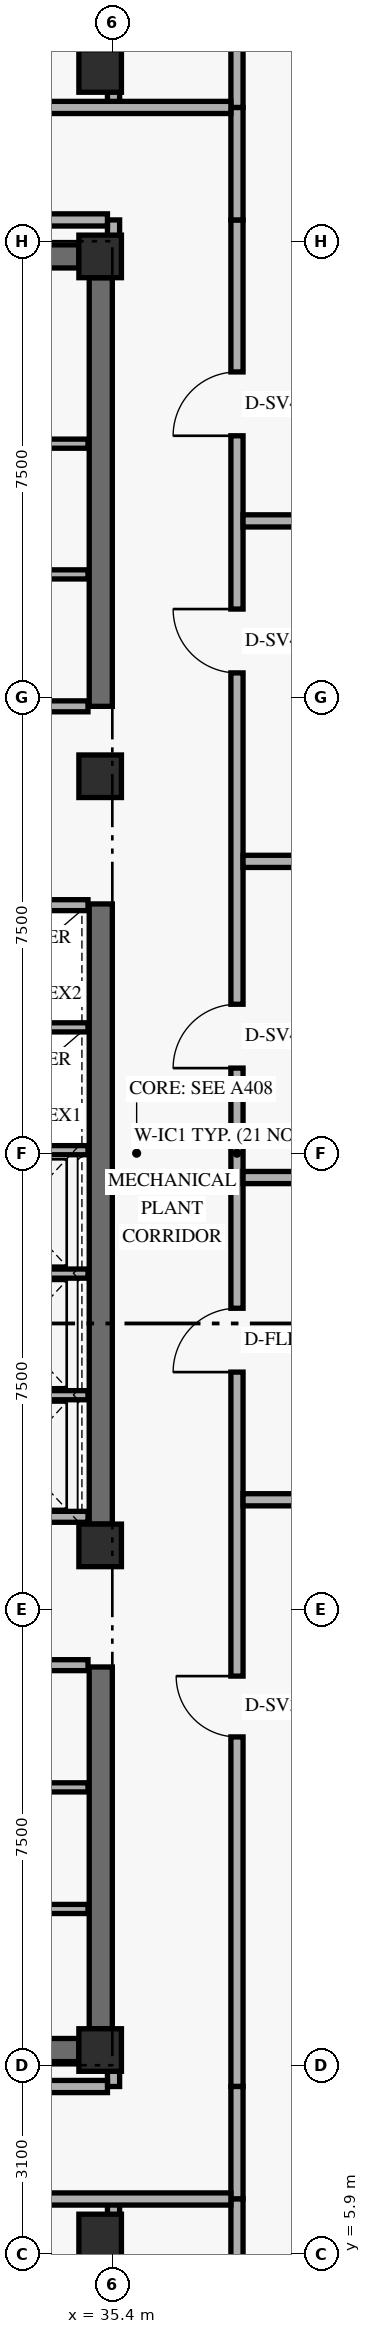
"""IFC4 building model, lengths in metres.
Left out: names, types, materials, properties, quantities, classifications, styles, units other than length and angle.
Written with IfcOpenShell. Run it as: python <this file> out.ifc"""

import sys

from ifc_helpers import new_model, si_unit, direction, frame, frame_2d, origin, origin_2d, place, context, subcontext, project, spatial, rectangle, extrude, element, fill, save


model = new_model("IFC4")
c1 = context("Model", 3, precision=1e-05, world=origin(), true_north=direction((0.0, 1.0)))
c2 = subcontext(c1, "Body", "Model", "MODEL_VIEW")
j1 = project(units=[si_unit("LENGTHUNIT", "METRE"), si_unit("PLANEANGLEUNIT", "RADIAN")], contexts=[c1])
p1 = place(None, origin())
s1 = spatial("IfcSite", under=j1, at=p1, CompositionType="ELEMENT")
p2 = place(p1, origin())
s2 = spatial("IfcBuilding", under=s1, at=p2, CompositionType="ELEMENT")
p3 = place(p2, frame((0.0, 0.0, 199.8)))
s3 = spatial("IfcBuildingStorey", under=s2, at=p3, CompositionType="ELEMENT", Elevation=199.8)
p4 = place(p3, frame((35.21, 9.6, 0.0), z_axis=(0.0, 0.0, 1.0), x_axis=(0.0, 1.0, 0.0)))
e1 = element("IfcWall", 1, at=p4, inside=s3, PredefinedType="SHEAR", context=c2, shape_type="SweptSolid", body=[
    extrude(rectangle(XDim=5.95, YDim=0.38, at=frame_2d((2.975, 0.0))), origin(), (0.0, 0.0, 1.0), 5.148),
])
p5 = place(p3, frame((35.21, 17.9, 0.0), z_axis=(0.0, 0.0, 1.0), x_axis=(0.0, 1.0, 0.0)))
e2 = element("IfcWall", 2, at=p5, inside=s3, PredefinedType="SHEAR", context=c2, shape_type="SweptSolid", body=[
    extrude(rectangle(XDim=10.2, YDim=0.38, at=frame_2d((5.1, 0.0))), origin(), (0.0, 0.0, 1.0), 5.148),
])
p6 = place(p3, frame((35.21, 31.35, 0.0), z_axis=(0.0, 0.0, 1.0), x_axis=(0.0, 1.0, 0.0)))
e3 = element("IfcWall", 3, at=p6, inside=s3, PredefinedType="SHEAR", context=c2, shape_type="SweptSolid", body=[
    extrude(rectangle(XDim=7.05, YDim=0.38, at=frame_2d((3.525, 0.0))), origin(), (0.0, 0.0, 1.0), 5.148),
])
for number, where, z_axis, x_axis in (
    (4, (24.55, 9.25, 0.0), (0.0, 0.0, 1.0), (1.0, 0.0, 0.0)),
    (5, (24.55, 38.75, 0.0), (0.0, 0.0, 1.0), (1.0, 0.0, 0.0)),
):
    element("IfcWall", number, at=place(p3, frame(where, z_axis=z_axis, x_axis=x_axis)), inside=s3, PredefinedType="SHEAR", context=c2, shape_type="SweptSolid", body=[
        extrude(rectangle(XDim=10.3, YDim=0.38, at=frame_2d((5.15, 0.0))), origin(), (0.0, 0.0, 1.0), 5.76),
    ])
for number, where, z_axis, x_axis in (
    (6, (35.2, 6.2, 0.0), (0.0, 0.0, 1.0), (1.0, 0.0, 0.0)),
    (7, (35.2, 9.25, 0.0), (0.0, 0.0, 1.0), (1.0, 0.0, 0.0)),
    (8, (35.2, 17.55, 0.0), (0.0, 0.0, 1.0), (1.0, 0.0, 0.0)),
    (9, (35.2, 30.2, 0.0), (0.0, 0.0, 1.0), (1.0, 0.0, 0.0)),
    (10, (35.2, 38.75, 0.0), (0.0, 0.0, 1.0), (1.0, 0.0, 0.0)),
    (11, (35.2, 41.8, 0.0), (0.0, 0.0, 1.0), (1.0, 0.0, 0.0)),
):
    element("IfcColumn", number, at=place(p3, frame(where, z_axis=z_axis, x_axis=x_axis)), inside=s3, PredefinedType="COLUMN", context=c2, shape_type="SweptSolid", body=[
        extrude(rectangle(XDim=0.7, YDim=0.7, at=origin_2d()), origin(), (0.0, 0.0, 1.0), 6.0),
    ])
p7 = place(p3, frame((32.74, 15.58, 0.0), z_axis=(0.0, 0.0, 1.0), x_axis=(1.0, 0.0, 0.0)))
e12 = element("IfcWall", 12, at=p7, inside=s3, PredefinedType="STANDARD", context=c2, shape_type="SweptSolid", body=[
    extrude(rectangle(XDim=2.26, YDim=0.18, at=frame_2d((1.13, 0.0))), origin(), (0.0, 0.0, 1.0), 5.76),
])
for number, where, z_axis, x_axis in (
    (13, (32.74, 11.57, 0.0), (0.0, 0.0, 1.0), (1.0, 0.0, 0.0)),
    (14, (32.74, 13.57, 0.0), (0.0, 0.0, 1.0), (1.0, 0.0, 0.0)),
):
    element("IfcWall", number, at=place(p3, frame(where, z_axis=z_axis, x_axis=x_axis)), inside=s3, PredefinedType="STANDARD", context=c2, shape_type="SweptSolid", body=[
        extrude(rectangle(XDim=2.26, YDim=0.15, at=frame_2d((1.13, 0.0))), origin(), (0.0, 0.0, 1.0), 5.76),
    ])
for number, where, z_axis, x_axis in (
    (15, (32.74, 18.02, 0.0), (0.0, 0.0, 1.0), (1.0, 0.0, 0.0)),
    (16, (32.74, 28.08, 0.0), (0.0, 0.0, 1.0), (1.0, 0.0, 0.0)),
):
    element("IfcWall", number, at=place(p3, frame(where, z_axis=z_axis, x_axis=x_axis)), inside=s3, PredefinedType="STANDARD", context=c2, shape_type="SweptSolid", body=[
        extrude(rectangle(XDim=2.26, YDim=0.18, at=frame_2d((1.13, 0.0))), origin(), (0.0, 0.0, 1.0), 5.76),
    ])
for number, where, z_axis, x_axis in (
    (17, (32.74, 20.02, 0.0), (0.0, 0.0, 1.0), (1.0, 0.0, 0.0)),
    (18, (32.74, 22.02, 0.0), (0.0, 0.0, 1.0), (1.0, 0.0, 0.0)),
    (19, (32.74, 24.05, 0.0), (0.0, 0.0, 1.0), (1.0, 0.0, 0.0)),
    (20, (32.74, 26.07, 0.0), (0.0, 0.0, 1.0), (1.0, 0.0, 0.0)),
):
    element("IfcWall", number, at=place(p3, frame(where, z_axis=z_axis, x_axis=x_axis)), inside=s3, PredefinedType="STANDARD", context=c2, shape_type="SweptSolid", body=[
        extrude(rectangle(XDim=2.26, YDim=0.15, at=frame_2d((1.13, 0.0))), origin(), (0.0, 0.0, 1.0), 5.76),
    ])
p8 = place(p3, frame((32.74, 31.35, 0.0), z_axis=(0.0, 0.0, 1.0), x_axis=(1.0, 0.0, 0.0)))
e21 = element("IfcWall", 21, at=p8, inside=s3, PredefinedType="STANDARD", context=c2, shape_type="SweptSolid", body=[
    extrude(rectangle(XDim=2.26, YDim=0.18, at=frame_2d((1.13, 0.0))), origin(), (0.0, 0.0, 1.0), 5.76),
])
for number, where, z_axis, x_axis in (
    (22, (32.74, 33.52, 0.0), (0.0, 0.0, 1.0), (1.0, 0.0, 0.0)),
    (23, (32.74, 35.67, 0.0), (0.0, 0.0, 1.0), (1.0, 0.0, 0.0)),
):
    element("IfcWall", number, at=place(p3, frame(where, z_axis=z_axis, x_axis=x_axis)), inside=s3, PredefinedType="STANDARD", context=c2, shape_type="SweptSolid", body=[
        extrude(rectangle(XDim=2.26, YDim=0.15, at=frame_2d((1.13, 0.0))), origin(), (0.0, 0.0, 1.0), 5.76),
    ])
p9 = place(p3, frame((37.45, 8.65, 0.0), z_axis=(0.0, 0.0, 1.0), x_axis=(0.0, 1.0, 0.0)))
e24 = element("IfcWall", 24, at=p9, inside=s3, PredefinedType="STANDARD", context=c2, shape_type="SweptSolid", body=[
    extrude(rectangle(XDim=30.7, YDim=0.2, at=frame_2d((15.35, 0.0))), origin(), (0.0, 0.0, 1.0), 5.13),
])
p10 = place(p9, frame((11.75, 0.0, 0.0)))
e25 = element("IfcOpeningElement", 25, at=p10, cuts=e24, PredefinedType="OPENING", context=c2, shape_type="SweptSolid", body=[
    extrude(rectangle(XDim=1.05, YDim=2.15, at=frame_2d((0.525, 1.075))), frame((0.0, 0.11, 0.0), z_axis=(0.0, -1.0, 0.0), x_axis=(1.0, 0.0, 0.0)), (0.0, 0.0, 1.0), 0.22),
])
p11 = place(p9, frame((5.75, 0.0, 0.0)))
e26 = element("IfcOpeningElement", 26, at=p11, cuts=e24, PredefinedType="OPENING", context=c2, shape_type="SweptSolid", body=[
    extrude(rectangle(XDim=1.0, YDim=2.15, at=frame_2d((0.5, 1.075))), frame((0.0, 0.11, 0.0), z_axis=(0.0, -1.0, 0.0), x_axis=(1.0, 0.0, 0.0)), (0.0, 0.0, 1.0), 0.22),
])
p12 = place(p9, frame((16.75, 0.0, 0.0)))
e27 = element("IfcOpeningElement", 27, at=p12, cuts=e24, PredefinedType="OPENING", context=c2, shape_type="SweptSolid", body=[
    extrude(rectangle(XDim=1.05, YDim=2.15, at=frame_2d((0.525, 1.075))), frame((0.0, 0.11, 0.0), z_axis=(0.0, -1.0, 0.0), x_axis=(1.0, 0.0, 0.0)), (0.0, 0.0, 1.0), 0.22),
])
p13 = place(p9, frame((23.25, 0.0, 0.0)))
e28 = element("IfcOpeningElement", 28, at=p13, cuts=e24, PredefinedType="OPENING", context=c2, shape_type="SweptSolid", body=[
    extrude(rectangle(XDim=1.05, YDim=2.15, at=frame_2d((0.525, 1.075))), frame((0.0, 0.11, 0.0), z_axis=(0.0, -1.0, 0.0), x_axis=(1.0, 0.0, 0.0)), (0.0, 0.0, 1.0), 0.22),
])
p14 = place(p9, frame((27.15, 0.0, 0.0)))
e29 = element("IfcOpeningElement", 29, at=p14, cuts=e24, PredefinedType="OPENING", context=c2, shape_type="SweptSolid", body=[
    extrude(rectangle(XDim=1.05, YDim=2.15, at=frame_2d((0.525, 1.075))), frame((0.0, 0.11, 0.0), z_axis=(0.0, -1.0, 0.0), x_axis=(1.0, 0.0, 0.0)), (0.0, 0.0, 1.0), 0.22),
])
for number, where, z_axis, x_axis in (
    (30, (37.45, 6.8, 0.0), (0.0, 0.0, 1.0), (0.0, 1.0, 0.0)),
    (31, (37.45, 39.35, 0.0), (0.0, 0.0, 1.0), (0.0, 1.0, 0.0)),
):
    element("IfcWall", number, at=place(p3, frame(where, z_axis=z_axis, x_axis=x_axis)), inside=s3, PredefinedType="STANDARD", context=c2, shape_type="SweptSolid", body=[
        extrude(rectangle(XDim=1.85, YDim=0.2, at=frame_2d((0.925, 0.0))), origin(), (0.0, 0.0, 1.0), 5.76),
    ])
for number, where, z_axis, x_axis in (
    (32, (37.45, 4.31, 0.0), (0.0, 0.0, 1.0), (0.0, 1.0, 0.0)),
    (33, (37.45, 41.2, 0.0), (0.0, 0.0, 1.0), (0.0, 1.0, 0.0)),
):
    element("IfcWall", number, at=place(p3, frame(where, z_axis=z_axis, x_axis=x_axis)), inside=s3, PredefinedType="STANDARD", context=c2, shape_type="SweptSolid", body=[
        extrude(rectangle(XDim=2.49, YDim=0.2, at=frame_2d((1.245, 0.0))), origin(), (0.0, 0.0, 1.0), 5.279),
    ])
p15 = place(p3, frame((35.42, 4.31, 0.0), z_axis=(0.0, 0.0, 1.0), x_axis=(0.0, 1.0, 0.0)))
e34 = element("IfcWall", 34, at=p15, inside=s3, PredefinedType="STANDARD", context=c2, shape_type="SweptSolid", body=[
    extrude(rectangle(XDim=2.49, YDim=0.2, at=frame_2d((1.245, 0.0))), origin(), (0.0, 0.0, 1.0), 5.13),
])
for number, where, z_axis, x_axis in (
    (35, (35.42, 8.65, 0.0), (0.0, 0.0, 1.0), (0.0, 1.0, 0.0)),
    (36, (35.42, 38.75, 0.0), (0.0, 0.0, 1.0), (0.0, 1.0, 0.0)),
):
    element("IfcWall", number, at=place(p3, frame(where, z_axis=z_axis, x_axis=x_axis)), inside=s3, PredefinedType="STANDARD", context=c2, shape_type="SweptSolid", body=[
        extrude(rectangle(XDim=0.6, YDim=0.2, at=frame_2d((0.3, 0.0))), origin(), (0.0, 0.0, 1.0), 5.13),
    ])
p16 = place(p3, frame((35.42, 41.2, 0.0), z_axis=(0.0, 0.0, 1.0), x_axis=(0.0, 1.0, 0.0)))
e37 = element("IfcWall", 37, at=p16, inside=s3, PredefinedType="STANDARD", context=c2, shape_type="SweptSolid", body=[
    extrude(rectangle(XDim=2.49, YDim=0.2, at=frame_2d((1.245, 0.0))), origin(), (0.0, 0.0, 1.0), 5.13),
])
for number, where, z_axis, x_axis in (
    (38, (37.55, 18.3, 0.0), (0.0, 0.0, 1.0), (1.0, 0.0, 0.0)),
    (39, (37.55, 23.6, 0.0), (0.0, 0.0, 1.0), (1.0, 0.0, 0.0)),
):
    element("IfcWall", number, at=place(p3, frame(where, z_axis=z_axis, x_axis=x_axis)), inside=s3, PredefinedType="STANDARD", context=c2, shape_type="SweptSolid", body=[
        extrude(rectangle(XDim=5.65, YDim=0.2, at=frame_2d((2.825, 0.0))), origin(), (0.0, 0.0, 1.0), 5.76),
    ])
p17 = place(p3, frame((37.55, 28.8, 0.0), z_axis=(0.0, 0.0, 1.0), x_axis=(1.0, 0.0, 0.0)))
e40 = element("IfcWall", 40, at=p17, inside=s3, PredefinedType="STANDARD", context=c2, shape_type="SweptSolid", body=[
    extrude(rectangle(XDim=11.34, YDim=0.2, at=frame_2d((5.67, 0.0))), origin(), (0.0, 0.0, 1.0), 5.13),
])
p18 = place(p3, frame((37.55, 34.4, 0.0), z_axis=(0.0, 0.0, 1.0), x_axis=(1.0, 0.0, 0.0)))
e41 = element("IfcWall", 41, at=p18, inside=s3, PredefinedType="STANDARD", context=c2, shape_type="SweptSolid", body=[
    extrude(rectangle(XDim=20.74, YDim=0.2, at=frame_2d((10.37, 0.0))), origin(), (0.0, 0.0, 1.0), 5.13),
])
p19 = place(p3, frame((21.75, 6.8, 0.0), z_axis=(0.0, 0.0, 1.0), x_axis=(1.0, 0.0, 0.0)))
e42 = element("IfcWall", 42, at=p19, inside=s3, PredefinedType="STANDARD", context=c2, shape_type="SweptSolid", body=[
    extrude(rectangle(XDim=15.6, YDim=0.2, at=frame_2d((7.8, 0.0))), origin(), (0.0, 0.0, 1.0), 5.13),
])
p20 = place(p19, frame((5.1, 0.0, 0.0)))
e43 = element("IfcOpeningElement", 43, at=p20, cuts=e42, PredefinedType="OPENING", context=c2, shape_type="SweptSolid", body=[
    extrude(rectangle(XDim=0.9, YDim=2.1, at=frame_2d((0.45, 1.05))), frame((0.0, 0.11, 0.0), z_axis=(0.0, -1.0, 0.0), x_axis=(1.0, 0.0, 0.0)), (0.0, 0.0, 1.0), 0.22),
])
p21 = place(p3, frame((21.75, 41.2, 0.0), z_axis=(0.0, 0.0, 1.0), x_axis=(1.0, 0.0, 0.0)))
e44 = element("IfcWall", 44, at=p21, inside=s3, PredefinedType="STANDARD", context=c2, shape_type="SweptSolid", body=[
    extrude(rectangle(XDim=15.6, YDim=0.2, at=frame_2d((7.8, 0.0))), origin(), (0.0, 0.0, 1.0), 5.13),
])
p22 = place(p21, frame((5.1, 0.0, 0.0)))
e45 = element("IfcOpeningElement", 45, at=p22, cuts=e44, PredefinedType="OPENING", context=c2, shape_type="SweptSolid", body=[
    extrude(rectangle(XDim=0.9, YDim=2.1, at=frame_2d((0.45, 1.05))), frame((0.0, 0.11, 0.0), z_axis=(0.0, -1.0, 0.0), x_axis=(1.0, 0.0, 0.0)), (0.0, 0.0, 1.0), 0.22),
])
for number, where, z_axis, x_axis in (
    (46, (23.85, 39.35, 0.0), (0.0, 0.0, 1.0), (1.0, 0.0, 0.0)),
    (47, (23.85, 8.65, 0.0), (0.0, 0.0, 1.0), (1.0, 0.0, 0.0)),
):
    element("IfcWall", number, at=place(p3, frame(where, z_axis=z_axis, x_axis=x_axis)), inside=s3, PredefinedType="STANDARD", context=c2, shape_type="SweptSolid", body=[
        extrude(rectangle(XDim=11.47, YDim=0.2, at=frame_2d((5.735, 0.0))), origin(), (0.0, 0.0, 1.0), 5.13),
    ])
p23 = place(p10, origin())
e48 = element("IfcDoor", 48, at=p23, inside=s3, OperationType="SINGLE_SWING_LEFT", PredefinedType="DOOR", context=c2, shape_type="SweptSolid", body=[
    extrude(rectangle(XDim=1.05, YDim=2.15, at=frame_2d((0.525, 1.075))), frame((0.0, 0.025, 0.0), z_axis=(0.0, -1.0, 0.0), x_axis=(1.0, 0.0, 0.0)), (0.0, 0.0, 1.0), 0.05),
])
fill(e25, e48)
p24 = place(p11, origin())
e49 = element("IfcDoor", 49, at=p24, inside=s3, OperationType="SINGLE_SWING_RIGHT", PredefinedType="DOOR", context=c2, shape_type="SweptSolid", body=[
    extrude(rectangle(XDim=1.0, YDim=2.15, at=frame_2d((0.5, 1.075))), frame((0.0, 0.025, 0.0), z_axis=(0.0, -1.0, 0.0), x_axis=(1.0, 0.0, 0.0)), (0.0, 0.0, 1.0), 0.05),
])
fill(e26, e49)
p25 = place(p12, origin())
e50 = element("IfcDoor", 50, at=p25, inside=s3, OperationType="SINGLE_SWING_LEFT", PredefinedType="DOOR", context=c2, shape_type="SweptSolid", body=[
    extrude(rectangle(XDim=1.05, YDim=2.15, at=frame_2d((0.525, 1.075))), frame((0.0, 0.025, 0.0), z_axis=(0.0, -1.0, 0.0), x_axis=(1.0, 0.0, 0.0)), (0.0, 0.0, 1.0), 0.05),
])
fill(e27, e50)
p26 = place(p13, origin())
e51 = element("IfcDoor", 51, at=p26, inside=s3, OperationType="SINGLE_SWING_RIGHT", PredefinedType="DOOR", context=c2, shape_type="SweptSolid", body=[
    extrude(rectangle(XDim=1.05, YDim=2.15, at=frame_2d((0.525, 1.075))), frame((0.0, 0.025, 0.0), z_axis=(0.0, -1.0, 0.0), x_axis=(1.0, 0.0, 0.0)), (0.0, 0.0, 1.0), 0.05),
])
fill(e28, e51)
p27 = place(p14, origin())
e52 = element("IfcDoor", 52, at=p27, inside=s3, OperationType="SINGLE_SWING_LEFT", PredefinedType="DOOR", context=c2, shape_type="SweptSolid", body=[
    extrude(rectangle(XDim=1.05, YDim=2.15, at=frame_2d((0.525, 1.075))), frame((0.0, 0.025, 0.0), z_axis=(0.0, -1.0, 0.0), x_axis=(1.0, 0.0, 0.0)), (0.0, 0.0, 1.0), 0.05),
])
fill(e29, e52)
save(model, sys.argv[1])
